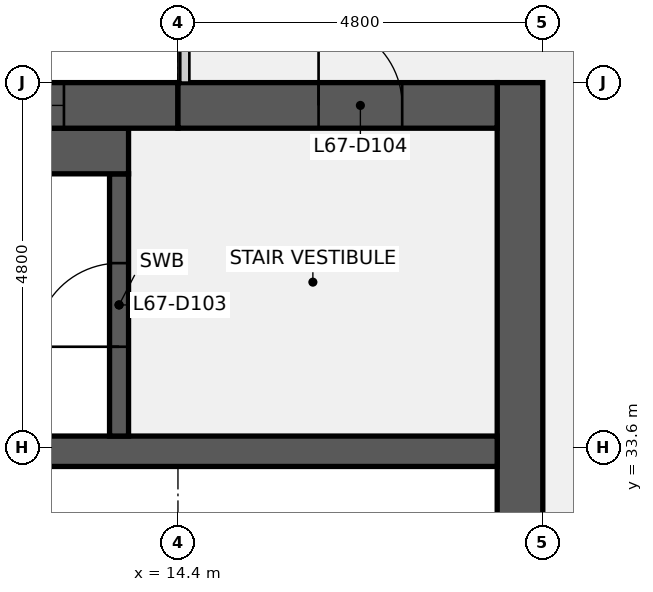
"""IFC4 building model, lengths in metres.
Left out: names, types, materials, properties, quantities, classifications, styles, units other than length and angle.
Written with IfcOpenShell. Run it as: python <this file> out.ifc"""

import sys

from ifc_helpers import new_model, si_unit, direction, frame, frame_2d, origin, place, context, subcontext, project, spatial, rectangle, extrude, element, fill, save


model = new_model("IFC4")
c1 = context("Model", 3, precision=1e-05, world=origin(), true_north=direction((0.0, 1.0)))
c2 = subcontext(c1, "Body", "Model", "MODEL_VIEW")
j1 = project(units=[si_unit("LENGTHUNIT", "METRE"), si_unit("PLANEANGLEUNIT", "RADIAN")], contexts=[c1])
p1 = place(None, origin())
s1 = spatial("IfcSite", under=j1, at=p1, CompositionType="ELEMENT")
p2 = place(p1, origin())
s2 = spatial("IfcBuilding", under=s1, at=p2, CompositionType="ELEMENT")
p3 = place(p2, frame((0.0, 0.0, 306.3)))
s3 = spatial("IfcBuildingStorey", under=s2, at=p3, CompositionType="ELEMENT", Elevation=306.3)
p4 = place(p3, frame((18.9, 38.4, 0.0), z_axis=(0.0, 0.0, 1.0), x_axis=(0.0, -1.0, 0.0)))
e1 = element("IfcWall", 1, at=p4, inside=s3, PredefinedType="SHEAR", context=c2, shape_type="SweptSolid", body=[
    extrude(rectangle(XDim=28.8, YDim=0.6, at=frame_2d((14.4, 0.0))), origin(), (0.0, 0.0, 1.0), 3.84),
])
p5 = place(p4, frame((18.3, 0.0, 0.0)))
e2 = element("IfcOpeningElement", 2, at=p5, cuts=e1, PredefinedType="OPENING", context=c2, shape_type="SweptSolid", body=[
    extrude(rectangle(XDim=1.8, YDim=2.1, at=frame_2d((0.9, 1.05))), frame((0.0, 0.31, 0.0), z_axis=(0.0, -1.0, 0.0), x_axis=(1.0, 0.0, 0.0)), (0.0, 0.0, 1.0), 0.62),
])
p6 = place(p4, frame((8.7, 0.0, 0.0)))
e3 = element("IfcOpeningElement", 3, at=p6, cuts=e1, PredefinedType="OPENING", context=c2, shape_type="SweptSolid", body=[
    extrude(rectangle(XDim=1.8, YDim=2.1, at=frame_2d((0.9, 1.05))), frame((0.0, 0.31, 0.0), z_axis=(0.0, -1.0, 0.0), x_axis=(1.0, 0.0, 0.0)), (0.0, 0.0, 1.0), 0.62),
])
p7 = place(p3, frame((0.6, 33.55, 0.0), z_axis=(0.0, 0.0, 1.0), x_axis=(1.0, 0.0, 0.0)))
e4 = element("IfcWall", 4, at=p7, inside=s3, PredefinedType="SHEAR", context=c2, shape_type="SweptSolid", body=[
    extrude(rectangle(XDim=18.0, YDim=0.4, at=frame_2d((9.0, 0.0))), origin(), (0.0, 0.0, 1.0), 3.84),
])
p8 = place(p3, frame((13.625, 33.75, 0.0), z_axis=(0.0, 0.0, 1.0), x_axis=(0.0, 1.0, 0.0)))
e5 = element("IfcWall", 5, at=p8, inside=s3, PredefinedType="SHEAR", context=c2, shape_type="SweptSolid", body=[
    extrude(rectangle(XDim=3.45, YDim=0.25, at=frame_2d((1.725, 0.0))), origin(), (0.0, 0.0, 1.0), 3.84),
])
p9 = place(p8, frame((1.175, 0.0, 0.0)))
e6 = element("IfcOpeningElement", 6, at=p9, cuts=e5, PredefinedType="OPENING", context=c2, shape_type="SweptSolid", body=[
    extrude(rectangle(XDim=1.1, YDim=2.1, at=frame_2d((0.55, 1.05))), frame((0.0, 0.135, 0.0), z_axis=(0.0, -1.0, 0.0), x_axis=(1.0, 0.0, 0.0)), (0.0, 0.0, 1.0), 0.27),
])
p10 = place(p3, frame((6.25, 37.5, 0.0), z_axis=(0.0, 0.0, 1.0), x_axis=(1.0, 0.0, 0.0)))
e7 = element("IfcWall", 7, at=p10, inside=s3, PredefinedType="SHEAR", context=c2, shape_type="SweptSolid", body=[
    extrude(rectangle(XDim=7.5, YDim=0.6, at=frame_2d((3.75, 0.0))), origin(), (0.0, 0.0, 1.0), 3.84),
])
p11 = place(p3, frame((0.6, 38.1, 0.0), z_axis=(0.0, 0.0, 1.0), x_axis=(1.0, 0.0, 0.0)))
e8 = element("IfcWall", 8, at=p11, inside=s3, PredefinedType="SHEAR", context=c2, shape_type="SweptSolid", body=[
    extrude(rectangle(XDim=13.8, YDim=0.6, at=frame_2d((6.9, 0.0))), origin(), (0.0, 0.0, 1.0), 3.84),
])
p12 = place(p11, frame((5.7, 0.0, 0.9)))
e9 = element("IfcOpeningElement", 9, at=p12, cuts=e8, PredefinedType="OPENING", context=c2, shape_type="SweptSolid", body=[
    extrude(rectangle(XDim=1.8, YDim=1.5, at=frame_2d((0.9, 0.75))), frame((0.0, 0.31, 0.0), z_axis=(0.0, -1.0, 0.0), x_axis=(1.0, 0.0, 0.0)), (0.0, 0.0, 1.0), 0.62),
])
p13 = place(p11, frame((10.5, 0.0, 0.9)))
e10 = element("IfcOpeningElement", 10, at=p13, cuts=e8, PredefinedType="OPENING", context=c2, shape_type="SweptSolid", body=[
    extrude(rectangle(XDim=1.8, YDim=1.5, at=frame_2d((0.9, 0.75))), frame((0.0, 0.31, 0.0), z_axis=(0.0, -1.0, 0.0), x_axis=(1.0, 0.0, 0.0)), (0.0, 0.0, 1.0), 0.62),
])
p14 = place(p3, frame((14.4, 38.1, 0.0), z_axis=(0.0, 0.0, 1.0), x_axis=(1.0, 0.0, 0.0)))
e11 = element("IfcWall", 11, at=p14, inside=s3, PredefinedType="SHEAR", context=c2, shape_type="SweptSolid", body=[
    extrude(rectangle(XDim=4.2, YDim=0.6, at=frame_2d((2.1, 0.0))), origin(), (0.0, 0.0, 1.0), 3.84),
])
p15 = place(p14, frame((1.85, 0.0, 0.0)))
e12 = element("IfcOpeningElement", 12, at=p15, cuts=e11, PredefinedType="OPENING", context=c2, shape_type="SweptSolid", body=[
    extrude(rectangle(XDim=1.1, YDim=2.1, at=frame_2d((0.55, 1.05))), frame((0.0, 0.31, 0.0), z_axis=(0.0, -1.0, 0.0), x_axis=(1.0, 0.0, 0.0)), (0.0, 0.0, 1.0), 0.62),
])
p16 = place(p9, origin())
e13 = element("IfcDoor", 13, at=p16, inside=s3, OperationType="SINGLE_SWING_LEFT", PredefinedType="DOOR", context=c2, shape_type="SweptSolid", body=[
    extrude(rectangle(XDim=1.1, YDim=2.1, at=frame_2d((0.55, 1.05))), frame((0.0, 0.025, 0.0), z_axis=(0.0, -1.0, 0.0), x_axis=(1.0, 0.0, 0.0)), (0.0, 0.0, 1.0), 0.05),
])
fill(e6, e13)
p17 = place(p15, origin())
e14 = element("IfcDoor", 14, at=p17, inside=s3, OperationType="SINGLE_SWING_LEFT", PredefinedType="DOOR", context=c2, shape_type="SweptSolid", body=[
    extrude(rectangle(XDim=1.1, YDim=2.1, at=frame_2d((0.55, 1.05))), frame((0.0, 0.025, 0.0), z_axis=(0.0, -1.0, 0.0), x_axis=(1.0, 0.0, 0.0)), (0.0, 0.0, 1.0), 0.05),
])
fill(e12, e14)
p18 = place(p13, origin())
e15 = element("IfcWindow", 15, at=p18, inside=s3, PartitioningType="SINGLE_PANEL", PredefinedType="WINDOW", context=c2, shape_type="SweptSolid", body=[
    extrude(rectangle(XDim=1.8, YDim=1.5, at=frame_2d((0.9, 0.75))), frame((0.0, 0.03, 0.0), z_axis=(0.0, -1.0, 0.0), x_axis=(1.0, 0.0, 0.0)), (0.0, 0.0, 1.0), 0.06),
])
fill(e10, e15)
save(model, sys.argv[1])
